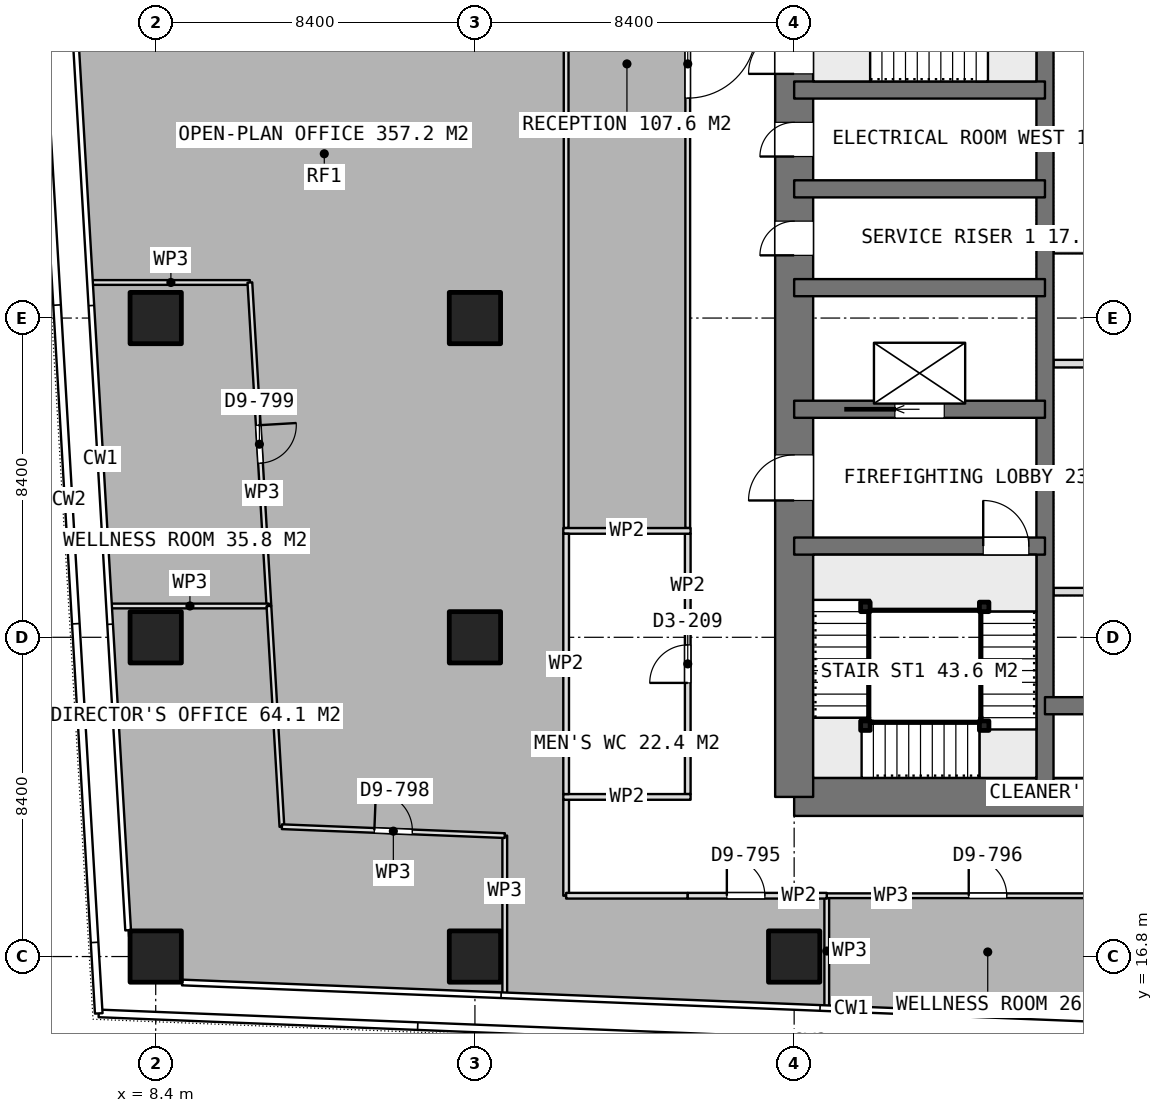
"""IFC4 building model, lengths in metres.
Left out: names, types, materials, properties, quantities, classifications, styles, units other than length and angle.
Written with IfcOpenShell. Run it as: python <this file> out.ifc"""

import sys

from ifc_helpers import new_model, si_unit, direction, frame, frame_2d, origin, origin_2d, place, context, subcontext, project, spatial, rectangle, extrude, element, fill, save


model = new_model("IFC4")
c1 = context("Model", 3, precision=1e-05, world=origin(), true_north=direction((0.0, 1.0)))
c2 = subcontext(c1, "Body", "Model", "MODEL_VIEW")
j1 = project(units=[si_unit("LENGTHUNIT", "METRE"), si_unit("PLANEANGLEUNIT", "RADIAN")], contexts=[c1])
p1 = place(None, origin())
s1 = spatial("IfcSite", under=j1, at=p1, CompositionType="ELEMENT")
p2 = place(p1, origin())
s2 = spatial("IfcBuilding", under=s1, at=p2, CompositionType="ELEMENT")
p3 = place(p2, frame((0.0, 0.0, 198.95)))
s3 = spatial("IfcBuildingStorey", under=s2, at=p3, CompositionType="ELEMENT", Elevation=198.95)
p4 = place(p3, frame((25.2, 21.0, 0.0), z_axis=(0.0, 0.0, 1.0), x_axis=(1.0, 0.0, 0.0)))
e1 = element("IfcWall", 1, at=p4, inside=s3, PredefinedType="SHEAR", context=c2, shape_type="SweptSolid", body=[
    extrude(rectangle(XDim=10.4, YDim=1.0, at=frame_2d((5.2, 0.0))), origin(), (0.0, 0.0, 1.0), 3.75),
])
p5 = place(p3, frame((25.2, 21.0, 0.0), z_axis=(0.0, 0.0, 1.0), x_axis=(0.0, 1.0, 0.0)))
e2 = element("IfcWall", 2, at=p5, inside=s3, PredefinedType="SHEAR", context=c2, shape_type="SweptSolid", body=[
    extrude(rectangle(XDim=25.2, YDim=1.0, at=frame_2d((12.6, 0.0))), origin(), (0.0, 0.0, 1.0), 3.75),
])
p6 = place(p5, frame((7.8, 0.0, 0.0)))
e3 = element("IfcOpeningElement", 3, at=p6, cuts=e2, PredefinedType="OPENING", context=c2, shape_type="SweptSolid", body=[
    extrude(rectangle(XDim=1.2, YDim=2.1, at=frame_2d((0.6, 1.05))), frame((0.0, 0.51, 0.0), z_axis=(0.0, -1.0, 0.0), x_axis=(1.0, 0.0, 0.0)), (0.0, 0.0, 1.0), 1.02),
])
p7 = place(p5, frame((14.25, 0.0, 0.0)))
e4 = element("IfcOpeningElement", 4, at=p7, cuts=e2, PredefinedType="OPENING", context=c2, shape_type="SweptSolid", body=[
    extrude(rectangle(XDim=0.9, YDim=2.1, at=frame_2d((0.45, 1.05))), frame((0.0, 0.51, 0.0), z_axis=(0.0, -1.0, 0.0), x_axis=(1.0, 0.0, 0.0)), (0.0, 0.0, 1.0), 1.02),
])
p8 = place(p5, frame((16.85, 0.0, 0.0)))
e5 = element("IfcOpeningElement", 5, at=p8, cuts=e2, PredefinedType="OPENING", context=c2, shape_type="SweptSolid", body=[
    extrude(rectangle(XDim=0.9, YDim=2.1, at=frame_2d((0.45, 1.05))), frame((0.0, 0.51, 0.0), z_axis=(0.0, -1.0, 0.0), x_axis=(1.0, 0.0, 0.0)), (0.0, 0.0, 1.0), 1.02),
])
p9 = place(p5, frame((19.025, 0.0, 0.0)))
e6 = element("IfcOpeningElement", 6, at=p9, cuts=e2, PredefinedType="OPENING", context=c2, shape_type="SweptSolid", body=[
    extrude(rectangle(XDim=1.2, YDim=2.1, at=frame_2d((0.6, 1.05))), frame((0.0, 0.51, 0.0), z_axis=(0.0, -1.0, 0.0), x_axis=(1.0, 0.0, 0.0)), (0.0, 0.0, 1.0), 1.02),
])
p10 = place(p3, frame((31.8, 21.0, 0.0), z_axis=(0.0, 0.0, 1.0), x_axis=(0.0, 1.0, 0.0)))
e7 = element("IfcWall", 7, at=p10, inside=s3, PredefinedType="SHEAR", context=c2, shape_type="SweptSolid", body=[
    extrude(rectangle(XDim=25.2, YDim=0.45, at=frame_2d((12.6, 0.0))), origin(), (0.0, 0.0, 1.0), 3.75),
])
p11 = place(p3, frame((31.8, 23.4, 0.0), z_axis=(0.0, 0.0, 1.0), x_axis=(1.0, 0.0, 0.0)))
e8 = element("IfcWall", 8, at=p11, inside=s3, PredefinedType="SHEAR", context=c2, shape_type="SweptSolid", body=[
    extrude(rectangle(XDim=3.8, YDim=0.45, at=frame_2d((1.9, 0.0))), origin(), (0.0, 0.0, 1.0), 3.75),
])
p12 = place(p3, frame((25.2, 27.6, 0.0), z_axis=(0.0, 0.0, 1.0), x_axis=(1.0, 0.0, 0.0)))
e9 = element("IfcWall", 9, at=p12, inside=s3, PredefinedType="SHEAR", context=c2, shape_type="SweptSolid", body=[
    extrude(rectangle(XDim=6.6, YDim=0.45, at=frame_2d((3.3, 0.0))), origin(), (0.0, 0.0, 1.0), 3.75),
])
p13 = place(p12, frame((4.975, 0.0, 0.0)))
e10 = element("IfcOpeningElement", 10, at=p13, cuts=e9, PredefinedType="OPENING", context=c2, shape_type="SweptSolid", body=[
    extrude(rectangle(XDim=1.2, YDim=2.1, at=frame_2d((0.6, 1.05))), frame((0.0, 0.235, 0.0), z_axis=(0.0, -1.0, 0.0), x_axis=(1.0, 0.0, 0.0)), (0.0, 0.0, 1.0), 0.47),
])
p14 = place(p3, frame((25.2, 31.2, 0.0), z_axis=(0.0, 0.0, 1.0), x_axis=(1.0, 0.0, 0.0)))
e11 = element("IfcWall", 11, at=p14, inside=s3, PredefinedType="SHEAR", context=c2, shape_type="SweptSolid", body=[
    extrude(rectangle(XDim=6.6, YDim=0.45, at=frame_2d((3.3, 0.0))), origin(), (0.0, 0.0, 1.0), 3.75),
])
p15 = place(p14, frame((2.65, 0.0, 0.0)))
e12 = element("IfcOpeningElement", 12, at=p15, cuts=e11, PredefinedType="OPENING", context=c2, shape_type="SweptSolid", body=[
    extrude(rectangle(XDim=1.3, YDim=2.1, at=frame_2d((0.65, 1.05))), frame((0.0, 0.235, 0.0), z_axis=(0.0, -1.0, 0.0), x_axis=(1.0, 0.0, 0.0)), (0.0, 0.0, 1.0), 0.47),
])
for number, where, z_axis, x_axis in (
    (13, (25.2, 34.4, 0.0), (0.0, 0.0, 1.0), (1.0, 0.0, 0.0)),
    (14, (25.2, 37.0, 0.0), (0.0, 0.0, 1.0), (1.0, 0.0, 0.0)),
    (15, (25.2, 39.6, 0.0), (0.0, 0.0, 1.0), (1.0, 0.0, 0.0)),
):
    element("IfcWall", number, at=place(p3, frame(where, z_axis=z_axis, x_axis=x_axis)), inside=s3, PredefinedType="SHEAR", context=c2, shape_type="SweptSolid", body=[
        extrude(rectangle(XDim=6.6, YDim=0.45, at=frame_2d((3.3, 0.0))), origin(), (0.0, 0.0, 1.0), 3.75),
    ])
for number, where, z_axis, x_axis in (
    (16, (8.4, 16.8, 0.0), (0.0, 0.0, 1.0), (1.0, 0.0, 0.0)),
    (17, (8.4, 25.2, 0.0), (0.0, 0.0, 1.0), (1.0, 0.0, 0.0)),
    (18, (8.4, 33.6, 0.0), (0.0, 0.0, 1.0), (1.0, 0.0, 0.0)),
    (19, (16.8, 16.8, 0.0), (0.0, 0.0, 1.0), (1.0, 0.0, 0.0)),
    (20, (16.8, 25.2, 0.0), (0.0, 0.0, 1.0), (1.0, 0.0, 0.0)),
    (21, (16.8, 33.6, 0.0), (0.0, 0.0, 1.0), (1.0, 0.0, 0.0)),
    (22, (25.2, 16.8, 0.0), (0.0, 0.0, 1.0), (1.0, 0.0, 0.0)),
):
    element("IfcColumn", number, at=place(p3, frame(where, z_axis=z_axis, x_axis=x_axis)), inside=s3, PredefinedType="COLUMN", context=c2, shape_type="SweptSolid", body=[
        extrude(rectangle(XDim=1.35, YDim=1.35, at=origin_2d()), origin(), (0.0, 0.0, 1.0), 3.75),
    ])
for number, where, z_axis, x_axis in (
    (23, (32.025, 26.4, 0.0), (0.0, 0.0, 1.0), (1.0, 0.0, 0.0)),
    (24, (32.025, 29.4, 0.0), (0.0, 0.0, 1.0), (1.0, 0.0, 0.0)),
    (25, (32.025, 32.4, 0.0), (0.0, 0.0, 1.0), (1.0, 0.0, 0.0)),
    (26, (32.025, 35.4, 0.0), (0.0, 0.0, 1.0), (1.0, 0.0, 0.0)),
    (27, (32.025, 38.4, 0.0), (0.0, 0.0, 1.0), (1.0, 0.0, 0.0)),
):
    element("IfcWall", number, at=place(p3, frame(where, z_axis=z_axis, x_axis=x_axis)), inside=s3, PredefinedType="PARTITIONING", context=c2, shape_type="SweptSolid", body=[
        extrude(rectangle(XDim=3.35, YDim=0.2, at=frame_2d((1.675, 0.0))), origin(), (0.0, 0.0, 1.0), 3.5),
    ])
for number, where, z_axis, x_axis in (
    (28, (19.125, 21.0, 0.0), (0.0, 0.0, 1.0), (1.0, 0.0, 0.0)),
    (29, (19.125, 28.0, 0.0), (0.0, 0.0, 1.0), (1.0, 0.0, 0.0)),
):
    element("IfcWall", number, at=place(p3, frame(where, z_axis=z_axis, x_axis=x_axis)), inside=s3, PredefinedType="PARTITIONING", context=c2, shape_type="SweptSolid", body=[
        extrude(rectangle(XDim=3.35, YDim=0.15, at=frame_2d((1.675, 0.0))), origin(), (0.0, 0.0, 1.0), 3.5),
    ])
p16 = place(p3, frame((19.2, 21.075, 0.0), z_axis=(0.0, 0.0, 1.0), x_axis=(0.0, 1.0, 0.0)))
e30 = element("IfcWall", 30, at=p16, inside=s3, PredefinedType="PARTITIONING", context=c2, shape_type="SweptSolid", body=[
    extrude(rectangle(XDim=6.85, YDim=0.15, at=frame_2d((3.425, 0.0))), origin(), (0.0, 0.0, 1.0), 3.5),
])
p17 = place(p3, frame((22.4, 21.075, 0.0), z_axis=(0.0, 0.0, 1.0), x_axis=(0.0, 1.0, 0.0)))
e31 = element("IfcWall", 31, at=p17, inside=s3, PredefinedType="PARTITIONING", context=c2, shape_type="SweptSolid", body=[
    extrude(rectangle(XDim=6.85, YDim=0.15, at=frame_2d((3.425, 0.0))), origin(), (0.0, 0.0, 1.0), 3.5),
])
p18 = place(p17, frame((2.925, 0.0, 0.0)))
e32 = element("IfcOpeningElement", 32, at=p18, cuts=e31, PredefinedType="OPENING", context=c2, shape_type="SweptSolid", body=[
    extrude(rectangle(XDim=1.0, YDim=2.1, at=frame_2d((0.5, 1.05))), frame((0.0, 0.085, 0.0), z_axis=(0.0, -1.0, 0.0), x_axis=(1.0, 0.0, 0.0)), (0.0, 0.0, 1.0), 0.17),
])
p19 = place(p3, frame((6.721, 34.536, 0.0), z_axis=(0.0, 0.0, 1.0), x_axis=(1.0, 0.0, 0.0)))
e33 = element("IfcWall", 33, at=p19, inside=s3, PredefinedType="PARTITIONING", context=c2, shape_type="SweptSolid", body=[
    extrude(rectangle(XDim=4.157, YDim=0.125, at=frame_2d((2.079, 0.0))), origin(), (0.0, 0.0, 1.0), 3.5),
])
p20 = place(p3, frame((10.878, 34.536, 0.0), z_axis=(0.0, 0.0, 1.0), x_axis=(0.058753912615, -0.998272496742, 0.0)))
e34 = element("IfcWall", 34, at=p20, inside=s3, PredefinedType="PARTITIONING", context=c2, shape_type="SweptSolid", body=[
    extrude(rectangle(XDim=8.527, YDim=0.125, at=frame_2d((4.263, 0.0))), origin(), (0.0, 0.0, 1.0), 3.5),
])
p21 = place(p20, frame((3.763, 0.0, 0.0)))
e35 = element("IfcOpeningElement", 35, at=p21, cuts=e34, PredefinedType="OPENING", context=c2, shape_type="SweptSolid", body=[
    extrude(rectangle(XDim=1.0, YDim=2.1, at=frame_2d((0.5, 1.05))), frame((0.0, 0.073, 0.0), z_axis=(0.0, -1.0, 0.0), x_axis=(1.0, 0.0, 0.0)), (0.0, 0.0, 1.0), 0.145),
])
p22 = place(p3, frame((11.379, 26.024, 0.0), z_axis=(0.0, 0.0, 1.0), x_axis=(-1.0, 0.0, 0.0)))
e36 = element("IfcWall", 36, at=p22, inside=s3, PredefinedType="PARTITIONING", context=c2, shape_type="SweptSolid", body=[
    extrude(rectangle(XDim=4.157, YDim=0.125, at=frame_2d((2.079, 0.0))), origin(), (0.0, 0.0, 1.0), 3.5),
])
p23 = place(p3, frame((17.585, 19.982, 0.0), z_axis=(0.0, 0.0, 1.0), x_axis=(0.0, -1.0, 0.0)))
e37 = element("IfcWall", 37, at=p23, inside=s3, PredefinedType="PARTITIONING", context=c2, shape_type="SweptSolid", body=[
    extrude(rectangle(XDim=4.153, YDim=0.125, at=frame_2d((2.076, 0.0))), origin(), (0.0, 0.0, 1.0), 3.5),
])
p24 = place(p3, frame((11.379, 26.023, 0.0), z_axis=(0.0, 0.0, 1.0), x_axis=(0.058800752748, -0.998269738836, 0.0)))
e38 = element("IfcWall", 38, at=p24, inside=s3, PredefinedType="PARTITIONING", context=c2, shape_type="SweptSolid", body=[
    extrude(rectangle(XDim=5.817, YDim=0.125, at=frame_2d((2.908, 0.0))), origin(), (0.0, 0.0, 1.0), 3.5),
])
p25 = place(p3, frame((11.721, 20.216, 0.0), z_axis=(0.0, 0.0, 1.0), x_axis=(0.999203880049, -0.039894938214, 0.0)))
e39 = element("IfcWall", 39, at=p25, inside=s3, PredefinedType="PARTITIONING", context=c2, shape_type="SweptSolid", body=[
    extrude(rectangle(XDim=5.869, YDim=0.125, at=frame_2d((2.934, 0.0))), origin(), (0.0, 0.0, 1.0), 3.5),
])
p26 = place(p25, frame((2.434, 0.0, 0.0)))
e40 = element("IfcOpeningElement", 40, at=p26, cuts=e39, PredefinedType="OPENING", context=c2, shape_type="SweptSolid", body=[
    extrude(rectangle(XDim=1.0, YDim=2.1, at=frame_2d((0.5, 1.05))), frame((0.0, 0.073, 0.0), z_axis=(0.0, -1.0, 0.0), x_axis=(1.0, 0.0, 0.0)), (0.0, 0.0, 1.0), 0.145),
])
p27 = place(p3, frame((26.058, 15.49, 0.0), z_axis=(0.0, 0.0, 1.0), x_axis=(0.0, 1.0, 0.0)))
e41 = element("IfcWall", 41, at=p27, inside=s3, PredefinedType="PARTITIONING", context=c2, shape_type="SweptSolid", body=[
    extrude(rectangle(XDim=2.91, YDim=0.125, at=frame_2d((1.455, 0.0))), origin(), (0.0, 0.0, 1.0), 3.5),
])
p28 = place(p3, frame((26.058, 18.4, 0.0), z_axis=(0.0, 0.0, 1.0), x_axis=(1.0, 0.0, 0.0)))
e42 = element("IfcWall", 42, at=p28, inside=s3, PredefinedType="PARTITIONING", context=c2, shape_type="SweptSolid", body=[
    extrude(rectangle(XDim=8.472, YDim=0.125, at=frame_2d((4.236, 0.0))), origin(), (0.0, 0.0, 1.0), 3.5),
])
p29 = place(p28, frame((3.736, 0.0, 0.0)))
e43 = element("IfcOpeningElement", 43, at=p29, cuts=e42, PredefinedType="OPENING", context=c2, shape_type="SweptSolid", body=[
    extrude(rectangle(XDim=1.0, YDim=2.1, at=frame_2d((0.5, 1.05))), frame((0.0, 0.073, 0.0), z_axis=(0.0, -1.0, 0.0), x_axis=(1.0, 0.0, 0.0)), (0.0, 0.0, 1.0), 0.145),
])
p30 = place(p3, frame((22.4, 52.575, 0.0), z_axis=(0.0, 0.0, 1.0), x_axis=(0.0, -1.0, 0.0)))
e44 = element("IfcWall", 44, at=p30, inside=s3, PredefinedType="PARTITIONING", context=c2, shape_type="SweptSolid", body=[
    extrude(rectangle(XDim=24.5, YDim=0.125, at=frame_2d((12.25, 0.0))), origin(), (0.0, 0.0, 1.0), 3.5),
])
p31 = place(p30, frame((11.388, 0.0, 0.0)))
e45 = element("IfcOpeningElement", 45, at=p31, cuts=e44, PredefinedType="OPENING", context=c2, shape_type="SweptSolid", body=[
    extrude(rectangle(XDim=1.8, YDim=2.1, at=frame_2d((0.9, 1.05))), frame((0.0, 0.073, 0.0), z_axis=(0.0, -1.0, 0.0), x_axis=(1.0, 0.0, 0.0)), (0.0, 0.0, 1.0), 0.145),
])
p32 = place(p3, frame((19.2, 28.075, 0.0), z_axis=(0.0, 0.0, 1.0), x_axis=(0.0, 1.0, 0.0)))
e46 = element("IfcWall", 46, at=p32, inside=s3, PredefinedType="PARTITIONING", context=c2, shape_type="SweptSolid", body=[
    extrude(rectangle(XDim=28.503, YDim=0.125, at=frame_2d((14.251, 0.0))), origin(), (0.0, 0.0, 1.0), 3.5),
])
p33 = place(p3, frame((19.2, 20.925, 0.0), z_axis=(0.0, 0.0, 1.0), x_axis=(0.0, -1.0, 0.0)))
e47 = element("IfcWall", 47, at=p33, inside=s3, PredefinedType="PARTITIONING", context=c2, shape_type="SweptSolid", body=[
    extrude(rectangle(XDim=2.525, YDim=0.15, at=frame_2d((1.263, 0.0))), origin(), (0.0, 0.0, 1.0), 3.5),
])
p34 = place(p3, frame((19.2, 18.4, 0.0), z_axis=(0.0, 0.0, 1.0), x_axis=(1.0, 0.0, 0.0)))
e48 = element("IfcWall", 48, at=p34, inside=s3, PredefinedType="PARTITIONING", context=c2, shape_type="SweptSolid", body=[
    extrude(rectangle(XDim=3.2, YDim=0.15, at=frame_2d((1.6, 0.0))), origin(), (0.0, 0.0, 1.0), 3.5),
])
p35 = place(p3, frame((22.4, 18.4, 0.0), z_axis=(0.0, 0.0, 1.0), x_axis=(1.0, 0.0, 0.0)))
e49 = element("IfcWall", 49, at=p35, inside=s3, PredefinedType="PARTITIONING", context=c2, shape_type="SweptSolid", body=[
    extrude(rectangle(XDim=3.658, YDim=0.15, at=frame_2d((1.829, 0.0))), origin(), (0.0, 0.0, 1.0), 3.5),
])
p36 = place(p35, frame((1.029, 0.0, 0.0)))
e50 = element("IfcOpeningElement", 50, at=p36, cuts=e49, PredefinedType="OPENING", context=c2, shape_type="SweptSolid", body=[
    extrude(rectangle(XDim=1.0, YDim=2.1, at=frame_2d((0.5, 1.05))), frame((0.0, 0.085, 0.0), z_axis=(0.0, -1.0, 0.0), x_axis=(1.0, 0.0, 0.0)), (0.0, 0.0, 1.0), 0.17),
])
for number, where, z_axis, x_axis in (
    (51, (30.2, 26.0, 0.0), (0.0, 0.0, 1.0), (1.0, 0.0, 0.0)),
    (52, (30.2, 22.875, 0.0), (0.0, 0.0, 1.0), (1.0, 0.0, 0.0)),
    (53, (27.075, 22.875, 0.0), (0.0, 0.0, 1.0), (1.0, 0.0, 0.0)),
    (54, (27.075, 26.0, 0.0), (0.0, 0.0, 1.0), (1.0, 0.0, 0.0)),
):
    element("IfcColumn", number, at=place(p3, frame(where, z_axis=z_axis, x_axis=x_axis)), inside=s3, PredefinedType="COLUMN", context=c2, shape_type="SweptSolid", body=[
        extrude(rectangle(XDim=0.25, YDim=0.25, at=origin_2d()), origin(), (0.0, 0.0, 1.0), 3.75),
    ])
p37 = place(p6, origin())
e55 = element("IfcDoor", 55, at=p37, inside=s3, OperationType="SINGLE_SWING_LEFT", PredefinedType="DOOR", context=c2, shape_type="SweptSolid", body=[
    extrude(rectangle(XDim=1.2, YDim=2.1, at=frame_2d((0.6, 1.05))), frame((0.0, 0.025, 0.0), z_axis=(0.0, -1.0, 0.0), x_axis=(1.0, 0.0, 0.0)), (0.0, 0.0, 1.0), 0.05),
])
fill(e3, e55)
p38 = place(p7, origin())
e56 = element("IfcDoor", 56, at=p38, inside=s3, OperationType="SINGLE_SWING_LEFT", PredefinedType="DOOR", context=c2, shape_type="SweptSolid", body=[
    extrude(rectangle(XDim=0.9, YDim=2.1, at=frame_2d((0.45, 1.05))), frame((0.0, 0.025, 0.0), z_axis=(0.0, -1.0, 0.0), x_axis=(1.0, 0.0, 0.0)), (0.0, 0.0, 1.0), 0.05),
])
fill(e4, e56)
p39 = place(p8, origin())
e57 = element("IfcDoor", 57, at=p39, inside=s3, OperationType="SINGLE_SWING_LEFT", PredefinedType="DOOR", context=c2, shape_type="SweptSolid", body=[
    extrude(rectangle(XDim=0.9, YDim=2.1, at=frame_2d((0.45, 1.05))), frame((0.0, 0.025, 0.0), z_axis=(0.0, -1.0, 0.0), x_axis=(1.0, 0.0, 0.0)), (0.0, 0.0, 1.0), 0.05),
])
fill(e5, e57)
p40 = place(p15, origin())
e58 = element("IfcDoor", 58, at=p40, inside=s3, OperationType="SLIDING_TO_LEFT", PredefinedType="USERDEFINED", context=c2, shape_type="SweptSolid", body=[
    extrude(rectangle(XDim=1.3, YDim=2.1, at=frame_2d((0.65, 1.05))), frame((0.0, 0.025, 0.0), z_axis=(0.0, -1.0, 0.0), x_axis=(1.0, 0.0, 0.0)), (0.0, 0.0, 1.0), 0.05),
])
fill(e12, e58)
p41 = place(p18, origin())
e59 = element("IfcDoor", 59, at=p41, inside=s3, OperationType="SINGLE_SWING_LEFT", PredefinedType="DOOR", context=c2, shape_type="SweptSolid", body=[
    extrude(rectangle(XDim=1.0, YDim=2.1, at=frame_2d((0.5, 1.05))), frame((0.0, 0.025, 0.0), z_axis=(0.0, -1.0, 0.0), x_axis=(1.0, 0.0, 0.0)), (0.0, 0.0, 1.0), 0.05),
])
fill(e32, e59)
p42 = place(p21, origin())
e60 = element("IfcDoor", 60, at=p42, inside=s3, OperationType="SINGLE_SWING_LEFT", PredefinedType="DOOR", context=c2, shape_type="SweptSolid", body=[
    extrude(rectangle(XDim=1.0, YDim=2.1, at=frame_2d((0.5, 1.05))), frame((0.0, 0.025, 0.0), z_axis=(0.0, -1.0, 0.0), x_axis=(1.0, 0.0, 0.0)), (0.0, 0.0, 1.0), 0.05),
])
fill(e35, e60)
p43 = place(p26, origin())
e61 = element("IfcDoor", 61, at=p43, inside=s3, OperationType="SINGLE_SWING_LEFT", PredefinedType="DOOR", context=c2, shape_type="SweptSolid", body=[
    extrude(rectangle(XDim=1.0, YDim=2.1, at=frame_2d((0.5, 1.05))), frame((0.0, 0.025, 0.0), z_axis=(0.0, -1.0, 0.0), x_axis=(1.0, 0.0, 0.0)), (0.0, 0.0, 1.0), 0.05),
])
fill(e40, e61)
p44 = place(p29, origin())
e62 = element("IfcDoor", 62, at=p44, inside=s3, OperationType="SINGLE_SWING_LEFT", PredefinedType="DOOR", context=c2, shape_type="SweptSolid", body=[
    extrude(rectangle(XDim=1.0, YDim=2.1, at=frame_2d((0.5, 1.05))), frame((0.0, 0.025, 0.0), z_axis=(0.0, -1.0, 0.0), x_axis=(1.0, 0.0, 0.0)), (0.0, 0.0, 1.0), 0.05),
])
fill(e43, e62)
p45 = place(p31, origin())
e63 = element("IfcDoor", 63, at=p45, inside=s3, OperationType="DOUBLE_DOOR_SINGLE_SWING", PredefinedType="DOOR", context=c2, shape_type="SweptSolid", body=[
    extrude(rectangle(XDim=1.8, YDim=2.1, at=frame_2d((0.9, 1.05))), frame((0.0, 0.025, 0.0), z_axis=(0.0, -1.0, 0.0), x_axis=(1.0, 0.0, 0.0)), (0.0, 0.0, 1.0), 0.05),
])
fill(e45, e63)
p46 = place(p36, origin())
e64 = element("IfcDoor", 64, at=p46, inside=s3, OperationType="SINGLE_SWING_LEFT", PredefinedType="DOOR", context=c2, shape_type="SweptSolid", body=[
    extrude(rectangle(XDim=1.0, YDim=2.1, at=frame_2d((0.5, 1.05))), frame((0.0, 0.025, 0.0), z_axis=(0.0, -1.0, 0.0), x_axis=(1.0, 0.0, 0.0)), (0.0, 0.0, 1.0), 0.05),
])
fill(e50, e64)
p47 = place(p13, origin())
e65 = element("IfcDoor", 65, at=p47, inside=s3, OperationType="SINGLE_SWING_RIGHT", PredefinedType="DOOR", context=c2, shape_type="SweptSolid", body=[
    extrude(rectangle(XDim=1.2, YDim=2.1, at=frame_2d((0.6, 1.05))), frame((0.0, 0.025, 0.0), z_axis=(0.0, -1.0, 0.0), x_axis=(1.0, 0.0, 0.0)), (0.0, 0.0, 1.0), 0.05),
])
fill(e10, e65)
p48 = place(p9, origin())
e66 = element("IfcDoor", 66, at=p48, inside=s3, OperationType="SINGLE_SWING_RIGHT", PredefinedType="DOOR", context=c2, shape_type="SweptSolid", body=[
    extrude(rectangle(XDim=1.2, YDim=2.1, at=frame_2d((0.6, 1.05))), frame((0.0, 0.025, 0.0), z_axis=(0.0, -1.0, 0.0), x_axis=(1.0, 0.0, 0.0)), (0.0, 0.0, 1.0), 0.05),
])
fill(e6, e66)
save(model, sys.argv[1])
